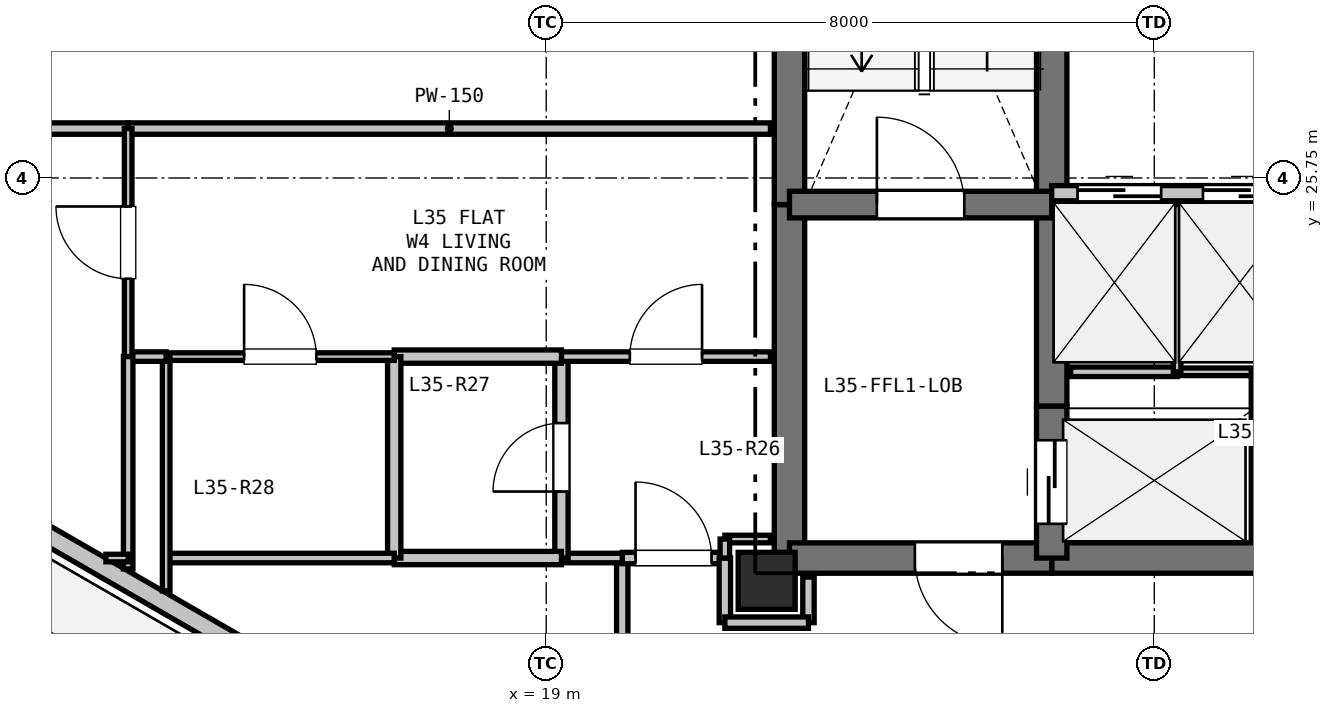
"""IFC4 building model, lengths in metres.
Left out: names, types, materials, properties, quantities, classifications, styles, units other than length and angle.
Written with IfcOpenShell. Run it as: python <this file> out.ifc"""

import sys

from ifc_helpers import new_model, si_unit, direction, frame, frame_2d, origin, origin_2d, place, context, subcontext, project, spatial, rectangle, extrude, element, fill, save


model = new_model("IFC4")
c1 = context("Model", 3, precision=1e-05, world=origin(), true_north=direction((0.0, 1.0)))
c2 = subcontext(c1, "Body", "Model", "MODEL_VIEW")
j1 = project(units=[si_unit("LENGTHUNIT", "METRE"), si_unit("PLANEANGLEUNIT", "RADIAN")], contexts=[c1])
p1 = place(None, origin())
s1 = spatial("IfcSite", under=j1, at=p1, CompositionType="ELEMENT")
p2 = place(p1, origin())
s2 = spatial("IfcBuilding", under=s1, at=p2, CompositionType="ELEMENT")
p3 = place(p2, frame((0.0, 0.0, 127.8)))
s3 = spatial("IfcBuildingStorey", under=s2, at=p3, CompositionType="ELEMENT", Elevation=127.8)
p4 = place(p3, frame((21.9, 20.45, 0.0), z_axis=(0.0, 0.0, 1.0), x_axis=(1.0, 0.0, 0.0)))
e1 = element("IfcColumn", 1, at=p4, inside=s3, PredefinedType="COLUMN", context=c2, shape_type="SweptSolid", body=[
    extrude(rectangle(XDim=0.75, YDim=0.75, at=origin_2d()), origin(), (0.0, 0.0, 1.0), 3.3),
])
p5 = place(p3, frame((16.378, 18.773, 0.0), z_axis=(0.0, 0.0, 1.0), x_axis=(-0.866027848477, 0.499995765644, 0.0)))
e2 = element("IfcWall", 2, at=p5, inside=s3, PredefinedType="SOLIDWALL", context=c2, shape_type="SweptSolid", body=[
    extrude(rectangle(XDim=11.186, YDim=0.25, at=frame_2d((5.593, 0.0))), origin(), (0.0, 0.0, 1.0), 2.68),
])
p6 = place(p5, frame((6.757, 0.0, 0.9)))
e3 = element("IfcOpeningElement", 3, at=p6, cuts=e2, PredefinedType="OPENING", context=c2, shape_type="SweptSolid", body=[
    extrude(rectangle(XDim=1.2, YDim=1.4, at=frame_2d((0.6, 0.7))), frame((0.0, 0.135, 0.0), z_axis=(0.0, -1.0, 0.0), x_axis=(1.0, 0.0, 0.0)), (0.0, 0.0, 1.0), 0.27),
])
p7 = place(p3, frame((22.2, 20.75, 0.0), z_axis=(0.0, 0.0, 1.0), x_axis=(0.0, 1.0, 0.0)))
e4 = element("IfcWall", 4, at=p7, inside=s3, PredefinedType="SHEAR", context=c2, shape_type="SweptSolid", body=[
    extrude(rectangle(XDim=4.65, YDim=0.4, at=frame_2d((2.325, 0.0))), origin(), (0.0, 0.0, 1.0), 3.06),
])
p8 = place(p3, frame((22.2, 25.4, 0.0), z_axis=(0.0, 0.0, 1.0), x_axis=(0.0, 1.0, 0.0)))
e5 = element("IfcWall", 5, at=p8, inside=s3, PredefinedType="SHEAR", context=c2, shape_type="SweptSolid", body=[
    extrude(rectangle(XDim=7.35, YDim=0.4, at=frame_2d((3.675, 0.0))), origin(), (0.0, 0.0, 1.0), 3.06),
])
p9 = place(p3, frame((28.35, 20.75, 0.0), z_axis=(0.0, 0.0, 1.0), x_axis=(-1.0, 0.0, 0.0)))
e6 = element("IfcWall", 6, at=p9, inside=s3, PredefinedType="SHEAR", context=c2, shape_type="SweptSolid", body=[
    extrude(rectangle(XDim=2.7, YDim=0.4, at=frame_2d((1.35, 0.0))), origin(), (0.0, 0.0, 1.0), 3.06),
])
p10 = place(p3, frame((25.65, 20.75, 0.0), z_axis=(0.0, 0.0, 1.0), x_axis=(-1.0, 0.0, 0.0)))
e7 = element("IfcWall", 7, at=p10, inside=s3, PredefinedType="SHEAR", context=c2, shape_type="SweptSolid", body=[
    extrude(rectangle(XDim=3.45, YDim=0.4, at=frame_2d((1.725, 0.0))), origin(), (0.0, 0.0, 1.0), 3.06),
])
p11 = place(p10, frame((0.65, 0.0, 0.0)))
e8 = element("IfcOpeningElement", 8, at=p11, cuts=e7, PredefinedType="OPENING", context=c2, shape_type="SweptSolid", body=[
    extrude(rectangle(XDim=1.15, YDim=2.15, at=frame_2d((0.575, 1.075))), frame((0.0, 0.21, 0.0), z_axis=(0.0, -1.0, 0.0), x_axis=(1.0, 0.0, 0.0)), (0.0, 0.0, 1.0), 0.42),
])
p12 = place(p3, frame((25.65, 20.75, 0.0), z_axis=(0.0, 0.0, 1.0), x_axis=(0.0, 1.0, 0.0)))
e9 = element("IfcWall", 9, at=p12, inside=s3, PredefinedType="SHEAR", context=c2, shape_type="SweptSolid", body=[
    extrude(rectangle(XDim=2.0, YDim=0.4, at=frame_2d((1.0, 0.0))), origin(), (0.0, 0.0, 1.0), 3.06),
])
p13 = place(p12, frame((0.45, 0.0, 0.0)))
e10 = element("IfcOpeningElement", 10, at=p13, cuts=e9, PredefinedType="OPENING", context=c2, shape_type="SweptSolid", body=[
    extrude(rectangle(XDim=1.1, YDim=2.15, at=frame_2d((0.55, 1.075))), frame((0.0, 0.21, 0.0), z_axis=(0.0, -1.0, 0.0), x_axis=(1.0, 0.0, 0.0)), (0.0, 0.0, 1.0), 0.42),
])
p14 = place(p3, frame((25.65, 22.75, 0.0), z_axis=(0.0, 0.0, 1.0), x_axis=(0.0, 1.0, 0.0)))
e11 = element("IfcWall", 11, at=p14, inside=s3, PredefinedType="SHEAR", context=c2, shape_type="SweptSolid", body=[
    extrude(rectangle(XDim=2.8, YDim=0.4, at=frame_2d((1.4, 0.0))), origin(), (0.0, 0.0, 1.0), 3.06),
])
p15 = place(p3, frame((25.65, 25.55, 0.0), z_axis=(0.0, 0.0, 1.0), x_axis=(0.0, 1.0, 0.0)))
e12 = element("IfcWall", 12, at=p15, inside=s3, PredefinedType="SHEAR", context=c2, shape_type="SweptSolid", body=[
    extrude(rectangle(XDim=2.4, YDim=0.4, at=frame_2d((1.2, 0.0))), origin(), (0.0, 0.0, 1.0), 3.06),
])
p16 = place(p3, frame((22.2, 25.4, 0.0), z_axis=(0.0, 0.0, 1.0), x_axis=(1.0, 0.0, 0.0)))
e13 = element("IfcWall", 13, at=p16, inside=s3, PredefinedType="SHEAR", context=c2, shape_type="SweptSolid", body=[
    extrude(rectangle(XDim=3.45, YDim=0.35, at=frame_2d((1.725, 0.0))), origin(), (0.0, 0.0, 1.0), 3.06),
])
p17 = place(p16, frame((1.15, 0.0, 0.0)))
e14 = element("IfcOpeningElement", 14, at=p17, cuts=e13, PredefinedType="OPENING", context=c2, shape_type="SweptSolid", body=[
    extrude(rectangle(XDim=1.15, YDim=2.15, at=frame_2d((0.575, 1.075))), frame((0.0, 0.185, 0.0), z_axis=(0.0, -1.0, 0.0), x_axis=(1.0, 0.0, 0.0)), (0.0, 0.0, 1.0), 0.37),
])
p18 = place(p3, frame((25.65, 25.55, 0.0), z_axis=(0.0, 0.0, 1.0), x_axis=(1.0, 0.0, 0.0)))
e15 = element("IfcWall", 15, at=p18, inside=s3, PredefinedType="PARTITIONING", context=c2, shape_type="SweptSolid", body=[
    extrude(rectangle(XDim=4.95, YDim=0.2, at=frame_2d((2.475, 0.0))), origin(), (0.0, 0.0, 1.0), 3.06),
])
p19 = place(p18, frame((0.34, 0.0, 0.0)))
e16 = element("IfcOpeningElement", 16, at=p19, cuts=e15, PredefinedType="OPENING", context=c2, shape_type="SweptSolid", body=[
    extrude(rectangle(XDim=1.1, YDim=2.15, at=frame_2d((0.55, 1.075))), frame((0.0, 0.11, 0.0), z_axis=(0.0, -1.0, 0.0), x_axis=(1.0, 0.0, 0.0)), (0.0, 0.0, 1.0), 0.22),
])
p20 = place(p18, frame((1.99, 0.0, 0.0)))
e17 = element("IfcOpeningElement", 17, at=p20, cuts=e15, PredefinedType="OPENING", context=c2, shape_type="SweptSolid", body=[
    extrude(rectangle(XDim=1.1, YDim=2.15, at=frame_2d((0.55, 1.075))), frame((0.0, 0.11, 0.0), z_axis=(0.0, -1.0, 0.0), x_axis=(1.0, 0.0, 0.0)), (0.0, 0.0, 1.0), 0.22),
])
p21 = place(p18, frame((3.64, 0.0, 0.0)))
e18 = element("IfcOpeningElement", 18, at=p21, cuts=e15, PredefinedType="OPENING", context=c2, shape_type="SweptSolid", body=[
    extrude(rectangle(XDim=1.1, YDim=2.15, at=frame_2d((0.55, 1.075))), frame((0.0, 0.11, 0.0), z_axis=(0.0, -1.0, 0.0), x_axis=(1.0, 0.0, 0.0)), (0.0, 0.0, 1.0), 0.22),
])
p22 = place(p3, frame((25.9, 23.2, 0.0), z_axis=(0.0, 0.0, 1.0), x_axis=(1.0, 0.0, 0.0)))
e19 = element("IfcWall", 19, at=p22, inside=s3, PredefinedType="PARTITIONING", context=c2, shape_type="SweptSolid", body=[
    extrude(rectangle(XDim=1.4, YDim=0.125, at=frame_2d((0.7, 0.0))), origin(), (0.0, 0.0, 1.0), 3.06),
])
p23 = place(p3, frame((27.3, 23.2, 0.0), z_axis=(0.0, 0.0, 1.0), x_axis=(1.0, 0.0, 0.0)))
e20 = element("IfcWall", 20, at=p23, inside=s3, PredefinedType="PARTITIONING", context=c2, shape_type="SweptSolid", body=[
    extrude(rectangle(XDim=1.05, YDim=0.1, at=frame_2d((0.525, 0.0))), origin(), (0.0, 0.0, 1.0), 3.06),
])
p24 = place(p3, frame((28.35, 23.2, 0.0), z_axis=(0.0, 0.0, 1.0), x_axis=(0.0, -1.0, 0.0)))
e21 = element("IfcWall", 21, at=p24, inside=s3, PredefinedType="PARTITIONING", context=c2, shape_type="SweptSolid", body=[
    extrude(rectangle(XDim=2.2, YDim=0.15, at=frame_2d((1.1, 0.0))), origin(), (0.0, 0.0, 1.0), 3.06),
])
p25 = place(p3, frame((27.3, 25.4, 0.0), z_axis=(0.0, 0.0, 1.0), x_axis=(0.0, -1.0, 0.0)))
e22 = element("IfcWall", 22, at=p25, inside=s3, PredefinedType="PARTITIONING", context=c2, shape_type="SweptSolid", body=[
    extrude(rectangle(XDim=2.2, YDim=0.1, at=frame_2d((1.1, 0.0))), origin(), (0.0, 0.0, 1.0), 3.06),
])
p26 = place(p3, frame((22.45, 19.9, 0.0), z_axis=(0.0, 0.0, 1.0), x_axis=(0.0, 1.0, 0.0)))
e23 = element("IfcWall", 23, at=p26, inside=s3, PredefinedType="PARTITIONING", context=c2, shape_type="SweptSolid", body=[
    extrude(rectangle(XDim=0.6, YDim=0.15, at=frame_2d((0.3, 0.0))), origin(), (0.0, 0.0, 1.0), 2.433),
])
p27 = place(p3, frame((20.0, 18.15, 0.0), z_axis=(0.0, 0.0, 1.0), x_axis=(0.0, 1.0, 0.0)))
e24 = element("IfcWall", 24, at=p27, inside=s3, PredefinedType="PARTITIONING", context=c2, shape_type="SweptSolid", body=[
    extrude(rectangle(XDim=2.6, YDim=0.15, at=frame_2d((1.3, 0.0))), origin(), (0.0, 0.0, 1.0), 3.06),
])
p28 = place(p3, frame((20.0, 20.75, 0.0), z_axis=(0.0, 0.0, 1.0), x_axis=(1.0, 0.0, 0.0)))
e25 = element("IfcWall", 25, at=p28, inside=s3, PredefinedType="PARTITIONING", context=c2, shape_type="SweptSolid", body=[
    extrude(rectangle(XDim=1.35, YDim=0.15, at=frame_2d((0.675, 0.0))), origin(), (0.0, 0.0, 1.0), 2.433),
])
p29 = place(p28, frame((0.175, 0.0, 0.0)))
e26 = element("IfcOpeningElement", 26, at=p29, cuts=e25, PredefinedType="OPENING", context=c2, shape_type="SweptSolid", body=[
    extrude(rectangle(XDim=1.0, YDim=2.15, at=frame_2d((0.5, 1.075))), frame((0.0, 0.085, 0.0), z_axis=(0.0, -1.0, 0.0), x_axis=(1.0, 0.0, 0.0)), (0.0, 0.0, 1.0), 0.17),
])
p30 = place(p3, frame((21.35, 20.75, 0.0), z_axis=(0.0, 0.0, 1.0), x_axis=(0.0, -1.0, 0.0)))
e27 = element("IfcWall", 27, at=p30, inside=s3, PredefinedType="PARTITIONING", context=c2, shape_type="SweptSolid", body=[
    extrude(rectangle(XDim=0.85, YDim=0.15, at=frame_2d((0.425, 0.0))), origin(), (0.0, 0.0, 1.0), 2.433),
])
p31 = place(p3, frame((21.35, 19.9, 0.0), z_axis=(0.0, 0.0, 1.0), x_axis=(1.0, 0.0, 0.0)))
e28 = element("IfcWall", 28, at=p31, inside=s3, PredefinedType="PARTITIONING", context=c2, shape_type="SweptSolid", body=[
    extrude(rectangle(XDim=1.1, YDim=0.15, at=frame_2d((0.55, 0.0))), origin(), (0.0, 0.0, 1.0), 2.433),
])
p32 = place(p3, frame((20.0, 20.75, 0.0), z_axis=(0.0, 0.0, 1.0), x_axis=(-1.0, 0.0, 0.0)))
e29 = element("IfcWall", 29, at=p32, inside=s3, PredefinedType="PARTITIONING", context=c2, shape_type="SweptSolid", body=[
    extrude(rectangle(XDim=0.8, YDim=0.125, at=frame_2d((0.4, 0.0))), origin(), (0.0, 0.0, 1.0), 3.06),
])
p33 = place(p3, frame((19.2, 20.75, 0.0), z_axis=(0.0, 0.0, 1.0), x_axis=(0.0, 1.0, 0.0)))
e30 = element("IfcWall", 30, at=p33, inside=s3, PredefinedType="PLUMBINGWALL", context=c2, shape_type="SweptSolid", body=[
    extrude(rectangle(XDim=2.65, YDim=0.175, at=frame_2d((1.325, 0.0))), origin(), (0.0, 0.0, 1.0), 2.433),
])
p34 = place(p33, frame((0.875, 0.0, 0.0)))
e31 = element("IfcOpeningElement", 31, at=p34, cuts=e30, PredefinedType="OPENING", context=c2, shape_type="SweptSolid", body=[
    extrude(rectangle(XDim=0.9, YDim=2.1, at=frame_2d((0.45, 1.05))), frame((0.0, 0.097, 0.0), z_axis=(0.0, -1.0, 0.0), x_axis=(1.0, 0.0, 0.0)), (0.0, 0.0, 1.0), 0.195),
])
p35 = place(p3, frame((19.2, 23.4, 0.0), z_axis=(0.0, 0.0, 1.0), x_axis=(1.0, 0.0, 0.0)))
e32 = element("IfcWall", 32, at=p35, inside=s3, PredefinedType="PARTITIONING", context=c2, shape_type="SweptSolid", body=[
    extrude(rectangle(XDim=2.75, YDim=0.125, at=frame_2d((1.375, 0.0))), origin(), (0.0, 0.0, 1.0), 2.508),
])
p36 = place(p35, frame((0.9, 0.0, 0.0)))
e33 = element("IfcOpeningElement", 33, at=p36, cuts=e32, PredefinedType="OPENING", context=c2, shape_type="SweptSolid", body=[
    extrude(rectangle(XDim=0.95, YDim=2.1, at=frame_2d((0.475, 1.05))), frame((0.0, 0.073, 0.0), z_axis=(0.0, -1.0, 0.0), x_axis=(1.0, 0.0, 0.0)), (0.0, 0.0, 1.0), 0.145),
])
p37 = place(p3, frame((21.95, 21.0, 0.0), z_axis=(0.0, 0.0, 1.0), x_axis=(-1.0, 0.0, 0.0)))
e34 = element("IfcWall", 34, at=p37, inside=s3, PredefinedType="PARTITIONING", context=c2, shape_type="SweptSolid", body=[
    extrude(rectangle(XDim=0.6, YDim=0.1, at=frame_2d((0.3, 0.0))), origin(), (0.0, 0.0, 1.0), 2.508),
])
p38 = place(p3, frame((21.35, 21.0, 0.0), z_axis=(0.0, 0.0, 1.0), x_axis=(0.0, -1.0, 0.0)))
e35 = element("IfcWall", 35, at=p38, inside=s3, PredefinedType="PARTITIONING", context=c2, shape_type="SweptSolid", body=[
    extrude(rectangle(XDim=0.25, YDim=0.125, at=frame_2d((0.125, 0.0))), origin(), (0.0, 0.0, 1.0), 3.06),
])
for number, where, z_axis, x_axis in (
    (36, (17.0, 23.4, 0.0), (0.0, 0.0, 1.0), (1.0, 0.0, 0.0)),
    (37, (19.2, 20.75, 0.0), (0.0, 0.0, 1.0), (-1.0, 0.0, 0.0)),
):
    element("IfcWall", number, at=place(p3, frame(where, z_axis=z_axis, x_axis=x_axis)), inside=s3, PredefinedType="PLUMBINGWALL", context=c2, shape_type="SweptSolid", body=[
        extrude(rectangle(XDim=2.2, YDim=0.175, at=frame_2d((1.1, 0.0))), origin(), (0.0, 0.0, 1.0), 3.06),
    ])
p39 = place(p3, frame((17.0, 20.75, 0.0), z_axis=(0.0, 0.0, 1.0), x_axis=(0.0, 1.0, 0.0)))
e38 = element("IfcWall", 38, at=p39, inside=s3, PredefinedType="PLUMBINGWALL", context=c2, shape_type="SweptSolid", body=[
    extrude(rectangle(XDim=2.65, YDim=0.175, at=frame_2d((1.325, 0.0))), origin(), (0.0, 0.0, 1.0), 2.433),
])
p40 = place(p3, frame((14.0, 23.4, 0.0), z_axis=(0.0, 0.0, 1.0), x_axis=(1.0, 0.0, 0.0)))
e39 = element("IfcWall", 39, at=p40, inside=s3, PredefinedType="PARTITIONING", context=c2, shape_type="SweptSolid", body=[
    extrude(rectangle(XDim=3.0, YDim=0.1, at=frame_2d((1.5, 0.0))), origin(), (0.0, 0.0, 1.0), 3.06),
])
p41 = place(p40, frame((1.025, 0.0, 0.0)))
e40 = element("IfcOpeningElement", 40, at=p41, cuts=e39, PredefinedType="OPENING", context=c2, shape_type="SweptSolid", body=[
    extrude(rectangle(XDim=0.95, YDim=2.1, at=frame_2d((0.475, 1.05))), frame((0.0, 0.06, 0.0), z_axis=(0.0, -1.0, 0.0), x_axis=(1.0, 0.0, 0.0)), (0.0, 0.0, 1.0), 0.12),
])
p42 = place(p3, frame((17.0, 20.75, 0.0), z_axis=(0.0, 0.0, 1.0), x_axis=(-1.0, 0.0, 0.0)))
e41 = element("IfcWall", 41, at=p42, inside=s3, PredefinedType="PARTITIONING", context=c2, shape_type="SweptSolid", body=[
    extrude(rectangle(XDim=3.0, YDim=0.125, at=frame_2d((1.5, 0.0))), origin(), (0.0, 0.0, 1.0), 2.365),
])
p43 = place(p3, frame((14.0, 20.318, 0.0), z_axis=(0.0, 0.0, 1.0), x_axis=(0.0, 1.0, 0.0)))
e42 = element("IfcWall", 42, at=p43, inside=s3, PredefinedType="PARTITIONING", context=c2, shape_type="SweptSolid", body=[
    extrude(rectangle(XDim=3.082, YDim=0.1, at=frame_2d((1.541, 0.0))), origin(), (0.0, 0.0, 1.0), 2.365),
])
p44 = place(p3, frame((21.95, 26.4, 0.0), z_axis=(0.0, 0.0, 1.0), x_axis=(-1.0, 0.0, 0.0)))
e43 = element("IfcWall", 43, at=p44, inside=s3, PredefinedType="PARTITIONING", context=c2, shape_type="SweptSolid", body=[
    extrude(rectangle(XDim=8.45, YDim=0.15, at=frame_2d((4.225, 0.0))), origin(), (0.0, 0.0, 1.0), 2.508),
])
p45 = place(p3, frame((13.5, 26.4, 0.0), z_axis=(0.0, 0.0, 1.0), x_axis=(-1.0, 0.0, 0.0)))
e44 = element("IfcWall", 44, at=p45, inside=s3, PredefinedType="PARTITIONING", context=c2, shape_type="SweptSolid", body=[
    extrude(rectangle(XDim=6.791, YDim=0.15, at=frame_2d((3.396, 0.0))), origin(), (0.0, 0.0, 1.0), 2.724),
])
p46 = place(p3, frame((14.0, 23.4, 0.0), z_axis=(0.0, 0.0, 1.0), x_axis=(-1.0, 0.0, 0.0)))
e45 = element("IfcWall", 45, at=p46, inside=s3, PredefinedType="PARTITIONING", context=c2, shape_type="SweptSolid", body=[
    extrude(rectangle(XDim=0.5, YDim=0.125, at=frame_2d((0.25, 0.0))), origin(), (0.0, 0.0, 1.0), 3.06),
])
p47 = place(p3, frame((13.5, 23.4, 0.0), z_axis=(0.0, 0.0, 1.0), x_axis=(0.0, 1.0, 0.0)))
e46 = element("IfcWall", 46, at=p47, inside=s3, PredefinedType="PARTITIONING", context=c2, shape_type="SweptSolid", body=[
    extrude(rectangle(XDim=3.0, YDim=0.1, at=frame_2d((1.5, 0.0))), origin(), (0.0, 0.0, 1.0), 3.06),
])
p48 = place(p47, frame((1.025, 0.0, 0.0)))
e47 = element("IfcOpeningElement", 47, at=p48, cuts=e46, PredefinedType="OPENING", context=c2, shape_type="SweptSolid", body=[
    extrude(rectangle(XDim=0.95, YDim=2.1, at=frame_2d((0.475, 1.05))), frame((0.0, 0.06, 0.0), z_axis=(0.0, -1.0, 0.0), x_axis=(1.0, 0.0, 0.0)), (0.0, 0.0, 1.0), 0.12),
])
p49 = place(p3, frame((13.5, 23.4, 0.0), z_axis=(0.0, 0.0, 1.0), x_axis=(0.0, -1.0, 0.0)))
e48 = element("IfcWall", 48, at=p49, inside=s3, PredefinedType="PARTITIONING", context=c2, shape_type="SweptSolid", body=[
    extrude(rectangle(XDim=2.793, YDim=0.125, at=frame_2d((1.396, 0.0))), origin(), (0.0, 0.0, 1.0), 2.365),
])
p50 = place(p3, frame((13.5, 20.75, 0.0), z_axis=(0.0, 0.0, 1.0), x_axis=(-1.0, 0.0, 0.0)))
e49 = element("IfcWall", 49, at=p50, inside=s3, PredefinedType="PARTITIONING", context=c2, shape_type="SweptSolid", body=[
    extrude(rectangle(XDim=0.293, YDim=0.1, at=frame_2d((0.146, 0.0))), origin(), (0.0, 0.0, 1.0), 3.06),
])
p51 = place(p19, origin())
e50 = element("IfcDoor", 50, at=p51, inside=s3, OperationType="SLIDING_TO_LEFT", PredefinedType="DOOR", context=c2, shape_type="SweptSolid", body=[
    extrude(rectangle(XDim=1.1, YDim=2.15, at=frame_2d((0.55, 1.075))), frame((0.0, 0.025, 0.0), z_axis=(0.0, -1.0, 0.0), x_axis=(1.0, 0.0, 0.0)), (0.0, 0.0, 1.0), 0.05),
])
fill(e16, e50)
p52 = place(p20, origin())
e51 = element("IfcDoor", 51, at=p52, inside=s3, OperationType="SLIDING_TO_LEFT", PredefinedType="DOOR", context=c2, shape_type="SweptSolid", body=[
    extrude(rectangle(XDim=1.1, YDim=2.15, at=frame_2d((0.55, 1.075))), frame((0.0, 0.025, 0.0), z_axis=(0.0, -1.0, 0.0), x_axis=(1.0, 0.0, 0.0)), (0.0, 0.0, 1.0), 0.05),
])
fill(e17, e51)
p53 = place(p13, origin())
e52 = element("IfcDoor", 52, at=p53, inside=s3, OperationType="SLIDING_TO_LEFT", PredefinedType="DOOR", context=c2, shape_type="SweptSolid", body=[
    extrude(rectangle(XDim=1.1, YDim=2.15, at=frame_2d((0.55, 1.075))), frame((0.0, 0.025, 0.0), z_axis=(0.0, -1.0, 0.0), x_axis=(1.0, 0.0, 0.0)), (0.0, 0.0, 1.0), 0.05),
])
fill(e10, e52)
p54 = place(p17, origin())
e53 = element("IfcDoor", 53, at=p54, inside=s3, OperationType="SINGLE_SWING_LEFT", PredefinedType="DOOR", context=c2, shape_type="SweptSolid", body=[
    extrude(rectangle(XDim=1.15, YDim=2.15, at=frame_2d((0.575, 1.075))), frame((0.0, 0.025, 0.0), z_axis=(0.0, -1.0, 0.0), x_axis=(1.0, 0.0, 0.0)), (0.0, 0.0, 1.0), 0.05),
])
fill(e14, e53)
p55 = place(p11, origin())
e54 = element("IfcDoor", 54, at=p55, inside=s3, OperationType="SINGLE_SWING_LEFT", PredefinedType="DOOR", context=c2, shape_type="SweptSolid", body=[
    extrude(rectangle(XDim=1.15, YDim=2.15, at=frame_2d((0.575, 1.075))), frame((0.0, 0.025, 0.0), z_axis=(0.0, -1.0, 0.0), x_axis=(1.0, 0.0, 0.0)), (0.0, 0.0, 1.0), 0.05),
])
fill(e8, e54)
p56 = place(p29, origin())
e55 = element("IfcDoor", 55, at=p56, inside=s3, OperationType="SINGLE_SWING_LEFT", PredefinedType="DOOR", context=c2, shape_type="SweptSolid", body=[
    extrude(rectangle(XDim=1.0, YDim=2.15, at=frame_2d((0.5, 1.075))), frame((0.0, 0.025, 0.0), z_axis=(0.0, -1.0, 0.0), x_axis=(1.0, 0.0, 0.0)), (0.0, 0.0, 1.0), 0.05),
])
fill(e26, e55)
p57 = place(p34, origin())
e56 = element("IfcDoor", 56, at=p57, inside=s3, OperationType="SINGLE_SWING_LEFT", PredefinedType="DOOR", context=c2, shape_type="SweptSolid", body=[
    extrude(rectangle(XDim=0.9, YDim=2.1, at=frame_2d((0.45, 1.05))), frame((0.0, 0.025, 0.0), z_axis=(0.0, -1.0, 0.0), x_axis=(1.0, 0.0, 0.0)), (0.0, 0.0, 1.0), 0.05),
])
fill(e31, e56)
p58 = place(p36, origin())
e57 = element("IfcDoor", 57, at=p58, inside=s3, OperationType="SINGLE_SWING_RIGHT", PredefinedType="DOOR", context=c2, shape_type="SweptSolid", body=[
    extrude(rectangle(XDim=0.95, YDim=2.1, at=frame_2d((0.475, 1.05))), frame((0.0, 0.025, 0.0), z_axis=(0.0, -1.0, 0.0), x_axis=(1.0, 0.0, 0.0)), (0.0, 0.0, 1.0), 0.05),
])
fill(e33, e57)
p59 = place(p41, origin())
e58 = element("IfcDoor", 58, at=p59, inside=s3, OperationType="SINGLE_SWING_LEFT", PredefinedType="DOOR", context=c2, shape_type="SweptSolid", body=[
    extrude(rectangle(XDim=0.95, YDim=2.1, at=frame_2d((0.475, 1.05))), frame((0.0, 0.025, 0.0), z_axis=(0.0, -1.0, 0.0), x_axis=(1.0, 0.0, 0.0)), (0.0, 0.0, 1.0), 0.05),
])
fill(e40, e58)
p60 = place(p48, origin())
e59 = element("IfcDoor", 59, at=p60, inside=s3, OperationType="SINGLE_SWING_RIGHT", PredefinedType="DOOR", context=c2, shape_type="SweptSolid", body=[
    extrude(rectangle(XDim=0.95, YDim=2.1, at=frame_2d((0.475, 1.05))), frame((0.0, 0.025, 0.0), z_axis=(0.0, -1.0, 0.0), x_axis=(1.0, 0.0, 0.0)), (0.0, 0.0, 1.0), 0.05),
])
fill(e47, e59)
save(model, sys.argv[1])
